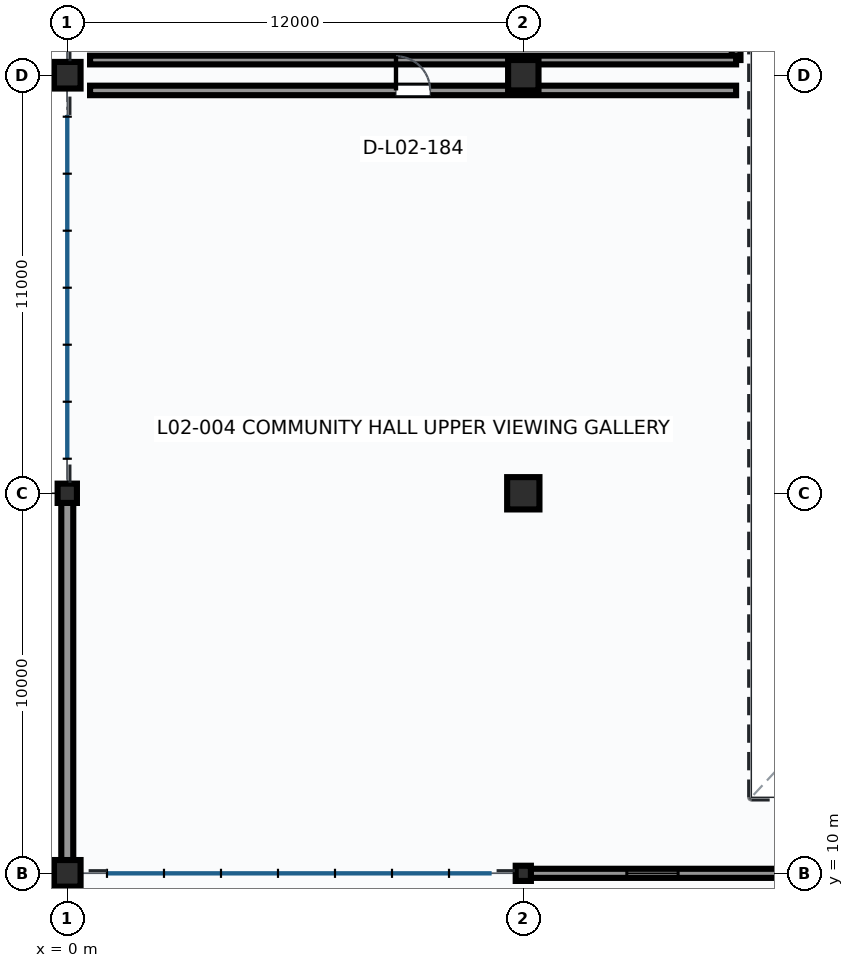
"""IFC4 building model, lengths in metres.
Left out: names, types, materials, properties, quantities, classifications, styles, units other than length and angle.
Written with IfcOpenShell. Run it as: python <this file> out.ifc"""

import sys

from ifc_helpers import new_model, si_unit, direction, frame, frame_2d, origin, origin_2d, place, context, subcontext, project, spatial, rectangle, hollow_rectangle, hollow_circle, extrude, element, fill, save


model = new_model("IFC4")
c1 = context("Model", 3, precision=1e-05, world=origin(), true_north=direction((0.0, 1.0)))
c2 = subcontext(c1, "Body", "Model", "MODEL_VIEW")
j1 = project(units=[si_unit("LENGTHUNIT", "METRE"), si_unit("PLANEANGLEUNIT", "RADIAN")], contexts=[c1])
p1 = place(None, origin())
s1 = spatial("IfcSite", under=j1, at=p1, CompositionType="ELEMENT")
p2 = place(p1, origin())
s2 = spatial("IfcBuilding", under=s1, at=p2, CompositionType="ELEMENT")
p3 = place(p2, frame((0.0, 0.0, 10.2)))
s3 = spatial("IfcBuildingStorey", under=s2, at=p3, CompositionType="ELEMENT", Elevation=10.2)
p4 = place(p3, frame((0.0, 10.0, 0.0), z_axis=(0.0, 0.0, 1.0), x_axis=(1.0, 0.0, 0.0)))
e1 = element("IfcColumn", 1, at=p4, inside=s3, PredefinedType="COLUMN", context=c2, shape_type="SweptSolid", body=[
    extrude(rectangle(XDim=0.7, YDim=0.7, at=origin_2d()), origin(), (0.0, 0.0, 1.0), 4.5),
])
p5 = place(p3, frame((0.0, 20.0, 0.0), z_axis=(0.0, 0.0, 1.0), x_axis=(1.0, 0.0, 0.0)))
e2 = element("IfcColumn", 2, at=p5, inside=s3, PredefinedType="COLUMN", context=c2, shape_type="SweptSolid", body=[
    extrude(hollow_circle(Radius=0.254, WallThickness=0.02, at=origin_2d()), origin(), (0.0, 0.0, 1.0), 4.5),
])
p6 = place(p3, frame((0.0, 31.0, 0.0), z_axis=(0.0, 0.0, 1.0), x_axis=(1.0, 0.0, 0.0)))
e3 = element("IfcColumn", 3, at=p6, inside=s3, PredefinedType="COLUMN", context=c2, shape_type="SweptSolid", body=[
    extrude(rectangle(XDim=0.7, YDim=0.7, at=origin_2d()), origin(), (0.0, 0.0, 1.0), 4.5),
])
p7 = place(p3, frame((12.0, 10.0, 0.0), z_axis=(0.0, 0.0, 1.0), x_axis=(1.0, 0.0, 0.0)))
e4 = element("IfcColumn", 4, at=p7, inside=s3, PredefinedType="COLUMN", context=c2, shape_type="SweptSolid", body=[
    extrude(hollow_rectangle(XDim=0.4, YDim=0.4, WallThickness=0.02, InnerFilletRadius=0.02, OuterFilletRadius=0.04, at=origin_2d()), origin(), (0.0, 0.0, 1.0), 4.5),
])
p8 = place(p3, frame((12.0, 20.0, 0.0), z_axis=(0.0, 0.0, 1.0), x_axis=(1.0, 0.0, 0.0)))
e5 = element("IfcColumn", 5, at=p8, inside=s3, PredefinedType="COLUMN", context=c2, shape_type="SweptSolid", body=[
    extrude(rectangle(XDim=0.85, YDim=0.85, at=origin_2d()), origin(), (0.0, 0.0, 1.0), 4.5),
])
p9 = place(p3, frame((12.0, 31.0, 0.0), z_axis=(0.0, 0.0, 1.0), x_axis=(1.0, 0.0, 0.0)))
e6 = element("IfcColumn", 6, at=p9, inside=s3, PredefinedType="COLUMN", context=c2, shape_type="SweptSolid", body=[
    extrude(rectangle(XDim=0.8, YDim=0.8, at=origin_2d()), origin(), (0.0, 0.0, 1.0), 4.5),
])
p10 = place(p3, frame((12.185, 10.0, 0.0), z_axis=(0.0, 0.0, 1.0), x_axis=(1.0, 0.0, 0.0)))
e7 = element("IfcWall", 7, at=p10, inside=s3, PredefinedType="SOLIDWALL", context=c2, shape_type="SweptSolid", body=[
    extrude(rectangle(XDim=11.48, YDim=0.24, at=frame_2d((5.74, 0.0))), origin(), (0.0, 0.0, 1.0), 3.13),
])
p11 = place(p10, frame((2.539, 0.0, 0.9)))
e8 = element("IfcOpeningElement", 8, at=p11, cuts=e7, PredefinedType="OPENING", context=c2, shape_type="SweptSolid", body=[
    extrude(rectangle(XDim=1.35, YDim=1.5, at=frame_2d((0.675, 0.75))), frame((0.0, 0.13, 0.0), z_axis=(0.0, -1.0, 0.0), x_axis=(1.0, 0.0, 0.0)), (0.0, 0.0, 1.0), 0.26),
])
p12 = place(p10, frame((7.591, 0.0, 0.9)))
e9 = element("IfcOpeningElement", 9, at=p12, cuts=e7, PredefinedType="OPENING", context=c2, shape_type="SweptSolid", body=[
    extrude(rectangle(XDim=1.35, YDim=1.8, at=frame_2d((0.675, 0.9))), frame((0.0, 0.13, 0.0), z_axis=(0.0, -1.0, 0.0), x_axis=(1.0, 0.0, 0.0)), (0.0, 0.0, 1.0), 0.26),
])
p13 = place(p3, frame((0.0, 10.335, 0.0), z_axis=(0.0, 0.0, 1.0), x_axis=(0.0, 1.0, 0.0)))
e10 = element("IfcWall", 10, at=p13, inside=s3, PredefinedType="SOLIDWALL", context=c2, shape_type="SweptSolid", body=[
    extrude(rectangle(XDim=9.426, YDim=0.315, at=frame_2d((4.713, 0.0))), origin(), (0.0, 0.0, 1.0), 3.519),
])
p14 = place(p3, frame((0.6, 30.6, 0.0), z_axis=(0.0, 0.0, 1.0), x_axis=(1.0, 0.0, 0.0)))
e11 = element("IfcWall", 11, at=p14, inside=s3, PredefinedType="SOLIDWALL", context=c2, shape_type="SweptSolid", body=[
    extrude(rectangle(XDim=17.0, YDim=0.25, at=frame_2d((8.5, 0.0))), origin(), (0.0, 0.0, 1.0), 3.28),
])
p15 = place(p14, frame((8.05, 0.0, 0.0)))
e12 = element("IfcOpeningElement", 12, at=p15, cuts=e11, PredefinedType="OPENING", context=c2, shape_type="SweptSolid", body=[
    extrude(rectangle(XDim=0.9, YDim=2.1, at=frame_2d((0.45, 1.05))), frame((0.0, 0.135, 0.0), z_axis=(0.0, -1.0, 0.0), x_axis=(1.0, 0.0, 0.0)), (0.0, 0.0, 1.0), 0.27),
])
p16 = place(p3, frame((17.6, 51.4, 0.0), z_axis=(0.0, 0.0, 1.0), x_axis=(0.0, -1.0, 0.0)))
e13 = element("IfcWall", 13, at=p16, inside=s3, PredefinedType="SOLIDWALL", context=c2, shape_type="SweptSolid", body=[
    extrude(rectangle(XDim=20.0, YDim=0.23, at=frame_2d((10.0, 0.0))), origin(), (0.0, 0.0, 1.0), 3.28),
])
p17 = place(p16, frame((9.525, 0.0, 0.0)))
e14 = element("IfcOpeningElement", 14, at=p17, cuts=e13, PredefinedType="OPENING", context=c2, shape_type="SweptSolid", body=[
    extrude(rectangle(XDim=0.95, YDim=2.15, at=frame_2d((0.475, 1.075))), frame((0.0, 0.125, 0.0), z_axis=(0.0, -1.0, 0.0), x_axis=(1.0, 0.0, 0.0)), (0.0, 0.0, 1.0), 0.25),
])
p18 = place(p3, frame((17.6, 31.4, 0.0), z_axis=(0.0, 0.0, 1.0), x_axis=(-1.0, 0.0, 0.0)))
e15 = element("IfcWall", 15, at=p18, inside=s3, PredefinedType="SOLIDWALL", context=c2, shape_type="SweptSolid", body=[
    extrude(rectangle(XDim=17.0, YDim=0.23, at=frame_2d((8.5, 0.0))), origin(), (0.0, 0.0, 1.0), 3.28),
])
p19 = place(p11, origin())
e16 = element("IfcWindow", 16, at=p19, inside=s3, PartitioningType="SINGLE_PANEL", PredefinedType="WINDOW", context=c2, shape_type="SweptSolid", body=[
    extrude(rectangle(XDim=1.35, YDim=1.5, at=frame_2d((0.675, 0.75))), frame((0.0, 0.03, 0.0), z_axis=(0.0, -1.0, 0.0), x_axis=(1.0, 0.0, 0.0)), (0.0, 0.0, 1.0), 0.06),
])
fill(e8, e16)
p20 = place(p15, origin())
e17 = element("IfcDoor", 17, at=p20, inside=s3, OperationType="SINGLE_SWING_LEFT", PredefinedType="DOOR", context=c2, shape_type="SweptSolid", body=[
    extrude(rectangle(XDim=0.9, YDim=2.1, at=frame_2d((0.45, 1.05))), frame((0.0, 0.025, 0.0), z_axis=(0.0, -1.0, 0.0), x_axis=(1.0, 0.0, 0.0)), (0.0, 0.0, 1.0), 0.05),
])
fill(e12, e17)
save(model, sys.argv[1])
